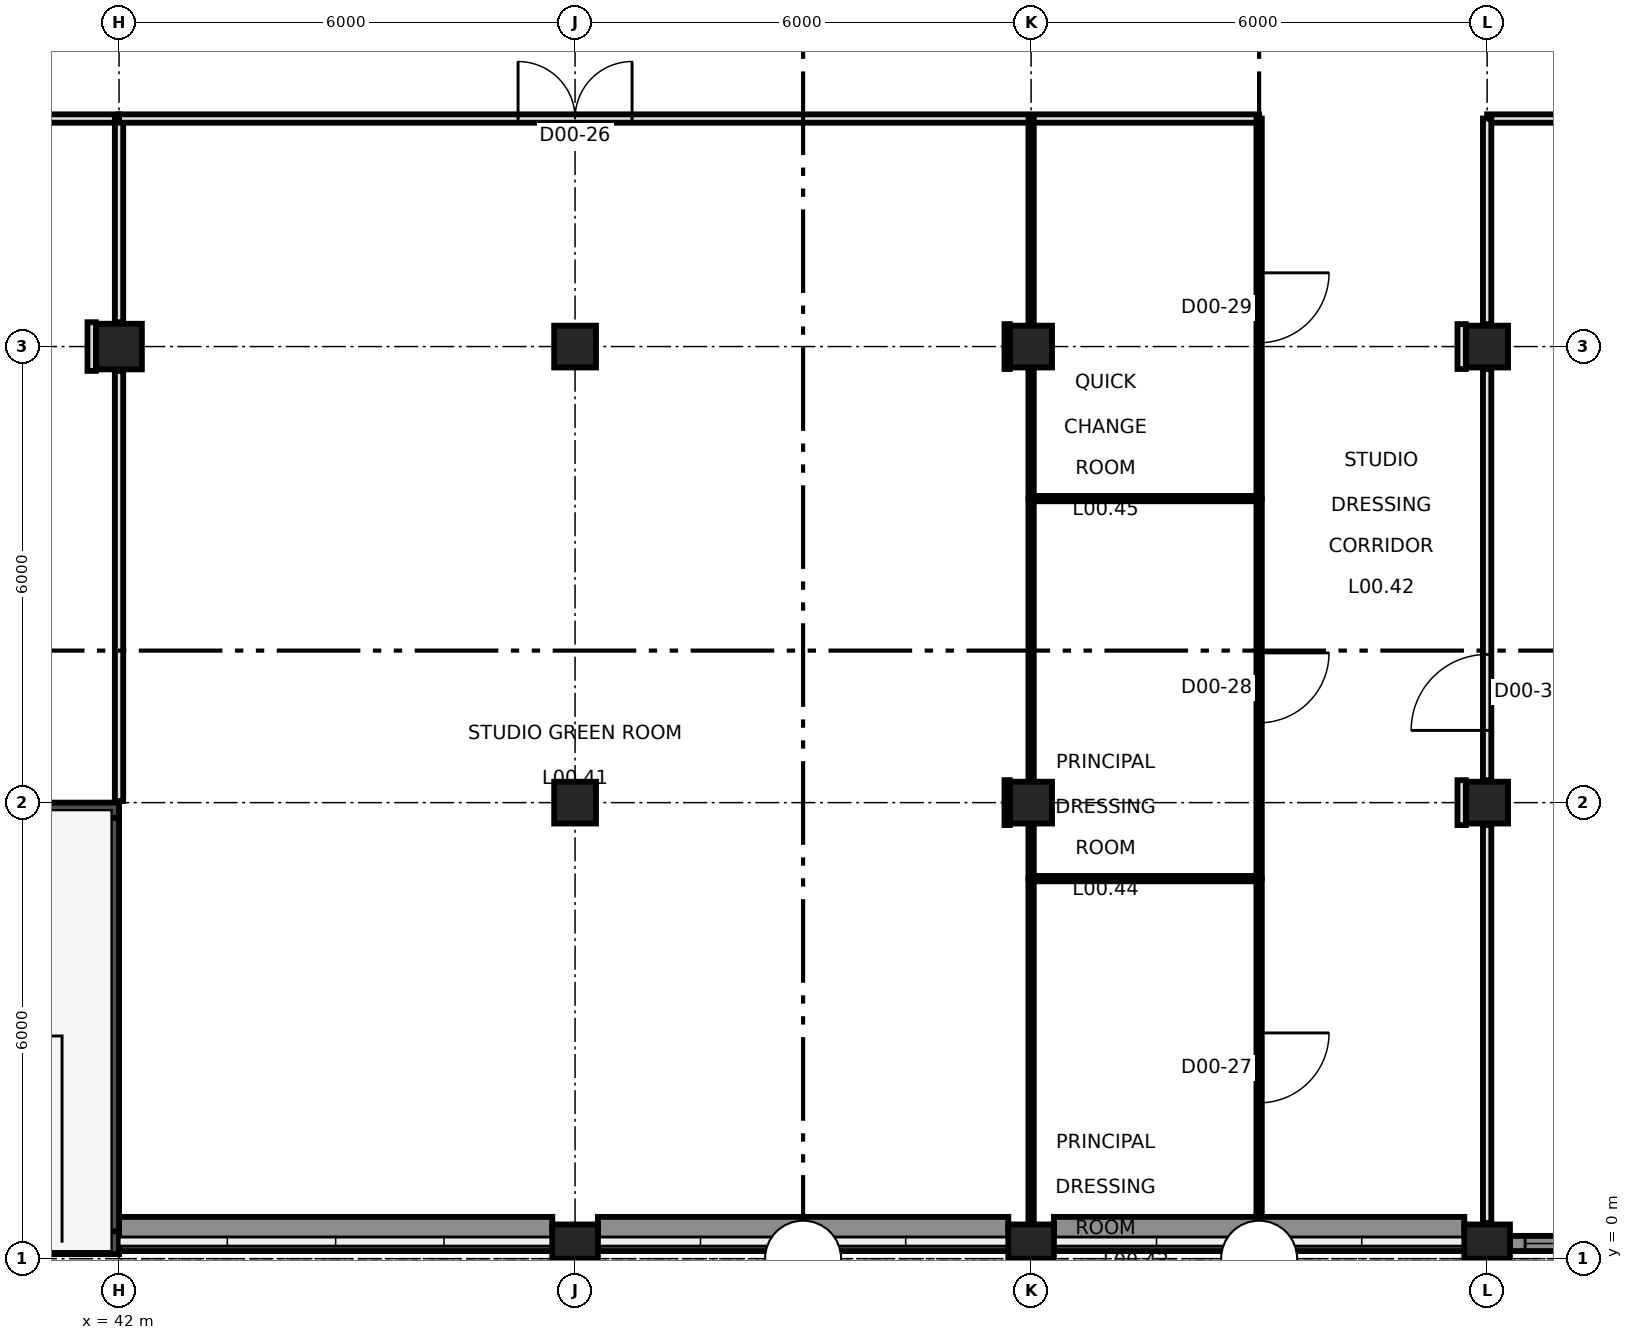
"""IFC4 building model, lengths in metres.
Left out: names, types, materials, properties, quantities, classifications, styles, units other than length and angle.
Written with IfcOpenShell. Run it as: python <this file> out.ifc"""

import sys

from ifc_helpers import new_model, si_unit, direction, frame, frame_2d, origin, origin_2d, place, context, subcontext, project, spatial, rectangle, extrude, element, fill, save


model = new_model("IFC4")
c1 = context("Model", 3, precision=1e-05, world=origin(), true_north=direction((0.0, 1.0)))
c2 = subcontext(c1, "Body", "Model", "MODEL_VIEW")
j1 = project(units=[si_unit("LENGTHUNIT", "METRE"), si_unit("PLANEANGLEUNIT", "RADIAN")], contexts=[c1])
p1 = place(None, origin())
s1 = spatial("IfcSite", under=j1, at=p1, CompositionType="ELEMENT")
p2 = place(p1, origin())
s2 = spatial("IfcBuilding", under=s1, at=p2, CompositionType="ELEMENT")
p3 = place(p2, origin())
s3 = spatial("IfcBuildingStorey", under=s2, at=p3, CompositionType="ELEMENT", Elevation=0.0)
for number, where, z_axis, x_axis in (
    (1, (48.0, 0.226, -0.3), (0.0, 0.0, 1.0), (1.0, 0.0, 0.0)),
    (2, (54.0, 0.226, -0.3), (0.0, 0.0, 1.0), (1.0, 0.0, 0.0)),
    (3, (60.0, 0.226, -0.3), (0.0, 0.0, 1.0), (1.0, 0.0, 0.0)),
):
    element("IfcColumn", number, at=place(p3, frame(where, z_axis=z_axis, x_axis=x_axis)), inside=s3, PredefinedType="COLUMN", context=c2, shape_type="SweptSolid", body=[
        extrude(rectangle(XDim=0.6, YDim=0.45, at=origin_2d()), origin(), (0.0, 0.0, 1.0), 7.3),
    ])
for number, where, z_axis, x_axis in (
    (4, (48.0, 6.0, -0.3), (0.0, 0.0, 1.0), (1.0, 0.0, 0.0)),
    (5, (54.0, 6.0, -0.3), (0.0, 0.0, 1.0), (1.0, 0.0, 0.0)),
    (6, (60.0, 6.0, -0.3), (0.0, 0.0, 1.0), (1.0, 0.0, 0.0)),
):
    element("IfcColumn", number, at=place(p3, frame(where, z_axis=z_axis, x_axis=x_axis)), inside=s3, PredefinedType="COLUMN", context=c2, shape_type="SweptSolid", body=[
        extrude(rectangle(XDim=0.55, YDim=0.55, at=origin_2d()), origin(), (0.0, 0.0, 1.0), 7.3),
    ])
p4 = place(p3, frame((42.0, 12.0, -0.3), z_axis=(0.0, 0.0, 1.0), x_axis=(1.0, 0.0, 0.0)))
e7 = element("IfcColumn", 7, at=p4, inside=s3, PredefinedType="COLUMN", context=c2, shape_type="SweptSolid", body=[
    extrude(rectangle(XDim=0.6, YDim=0.6, at=origin_2d()), origin(), (0.0, 0.0, 1.0), 7.3),
])
for number, where, z_axis, x_axis in (
    (8, (48.0, 12.0, -0.3), (0.0, 0.0, 1.0), (1.0, 0.0, 0.0)),
    (9, (54.0, 12.0, -0.3), (0.0, 0.0, 1.0), (1.0, 0.0, 0.0)),
    (10, (60.0, 12.0, -0.3), (0.0, 0.0, 1.0), (1.0, 0.0, 0.0)),
):
    element("IfcColumn", number, at=place(p3, frame(where, z_axis=z_axis, x_axis=x_axis)), inside=s3, PredefinedType="COLUMN", context=c2, shape_type="SweptSolid", body=[
        extrude(rectangle(XDim=0.55, YDim=0.55, at=origin_2d()), origin(), (0.0, 0.0, 1.0), 7.3),
    ])
p5 = place(p3, frame((36.0, 5.9, -0.3), z_axis=(0.0, 0.0, 1.0), x_axis=(1.0, 0.0, 0.0)))
e11 = element("IfcWall", 11, at=p5, inside=s3, PredefinedType="SHEAR", context=c2, shape_type="SweptSolid", body=[
    extrude(rectangle(XDim=6.0, YDim=0.2, at=frame_2d((3.0, 0.0))), origin(), (0.0, 0.0, 1.0), 7.3),
])
p6 = place(p3, frame((36.0, 0.21, -0.3), z_axis=(0.0, 0.0, 1.0), x_axis=(1.0, 0.0, 0.0)))
e12 = element("IfcWall", 12, at=p6, inside=s3, PredefinedType="SHEAR", context=c2, shape_type="SweptSolid", body=[
    extrude(rectangle(XDim=6.0, YDim=0.3, at=frame_2d((3.0, 0.0))), origin(), (0.0, 0.0, 1.0), 7.3),
])
p7 = place(p6, frame((0.325, 0.0, 0.3)))
e13 = element("IfcOpeningElement", 13, at=p7, cuts=e12, PredefinedType="OPENING", context=c2, shape_type="SweptSolid", body=[
    extrude(rectangle(XDim=1.8, YDim=2.4, at=frame_2d((0.9, 1.2))), frame((0.0, 0.16, 0.0), z_axis=(0.0, -1.0, 0.0), x_axis=(1.0, 0.0, 0.0)), (0.0, 0.0, 1.0), 0.32),
])
p8 = place(p3, frame((41.9, 0.3, -0.3), z_axis=(0.0, 0.0, 1.0), x_axis=(0.0, 1.0, 0.0)))
e14 = element("IfcWall", 14, at=p8, inside=s3, PredefinedType="SHEAR", context=c2, shape_type="SweptSolid", body=[
    extrude(rectangle(XDim=5.5, YDim=0.2, at=frame_2d((2.75, 0.0))), origin(), (0.0, 0.0, 1.0), 7.3),
])
p9 = place(p3, frame((65.54, 0.2, 0.0), z_axis=(0.0, 0.0, 1.0), x_axis=(-1.0, 0.0, 0.0)))
e15 = element("IfcWall", 15, at=p9, inside=s3, PredefinedType="SOLIDWALL", context=c2, shape_type="SweptSolid", body=[
    extrude(rectangle(XDim=5.24, YDim=0.2, at=frame_2d((2.62, 0.0))), origin(), (0.0, 0.0, 1.0), 6.75),
])
p10 = place(p9, frame((2.02, 0.0, 0.0)))
e16 = element("IfcOpeningElement", 16, at=p10, cuts=e15, PredefinedType="OPENING", context=c2, shape_type="SweptSolid", body=[
    extrude(rectangle(XDim=1.1, YDim=2.4, at=frame_2d((0.55, 1.2))), frame((0.0, 0.11, 0.0), z_axis=(0.0, -1.0, 0.0), x_axis=(1.0, 0.0, 0.0)), (0.0, 0.0, 1.0), 0.22),
])
p11 = place(p9, frame((2.02, 0.0, 2.5)))
e17 = element("IfcOpeningElement", 17, at=p11, cuts=e15, PredefinedType="OPENING", context=c2, shape_type="SweptSolid", body=[
    extrude(rectangle(XDim=1.1, YDim=3.9, at=frame_2d((0.55, 1.95))), frame((0.0, 0.11, 0.0), z_axis=(0.0, -1.0, 0.0), x_axis=(1.0, 0.0, 0.0)), (0.0, 0.0, 1.0), 0.22),
])
p12 = place(p9, frame((0.2, 0.0, 0.1)))
e18 = element("IfcOpeningElement", 18, at=p12, cuts=e15, PredefinedType="OPENING", context=c2, shape_type="SweptSolid", body=[
    extrude(rectangle(XDim=1.82, YDim=6.3, at=frame_2d((0.91, 3.15))), frame((0.0, 0.11, 0.0), z_axis=(0.0, -1.0, 0.0), x_axis=(1.0, 0.0, 0.0)), (0.0, 0.0, 1.0), 0.22),
])
p13 = place(p9, frame((3.12, 0.0, 0.1)))
e19 = element("IfcOpeningElement", 19, at=p13, cuts=e15, PredefinedType="OPENING", context=c2, shape_type="SweptSolid", body=[
    extrude(rectangle(XDim=1.92, YDim=6.3, at=frame_2d((0.96, 3.15))), frame((0.0, 0.11, 0.0), z_axis=(0.0, -1.0, 0.0), x_axis=(1.0, 0.0, 0.0)), (0.0, 0.0, 1.0), 0.22),
])
for number, where, z_axis, x_axis in (
    (20, (59.7, 0.325, 0.0), (0.0, 0.0, 1.0), (-1.0, 0.0, 0.0)),
    (21, (53.7, 0.325, 0.0), (0.0, 0.0, 1.0), (-1.0, 0.0, 0.0)),
):
    element("IfcWall", number, at=place(p3, frame(where, z_axis=z_axis, x_axis=x_axis)), inside=s3, PredefinedType="SOLIDWALL", context=c2, shape_type="SweptSolid", body=[
        extrude(rectangle(XDim=5.4, YDim=0.45, at=frame_2d((2.7, 0.0))), origin(), (0.0, 0.0, 1.0), 4.8),
    ])
p14 = place(p3, frame((47.7, 0.325, 0.0), z_axis=(0.0, 0.0, 1.0), x_axis=(-1.0, 0.0, 0.0)))
e22 = element("IfcWall", 22, at=p14, inside=s3, PredefinedType="SOLIDWALL", context=c2, shape_type="SweptSolid", body=[
    extrude(rectangle(XDim=5.7, YDim=0.45, at=frame_2d((2.85, 0.0))), origin(), (0.0, 0.0, 1.0), 4.8),
])
p15 = place(p3, frame((36.02, 15.0, 0.0), z_axis=(0.0, 0.0, 1.0), x_axis=(1.0, 0.0, 0.0)))
e23 = element("IfcWall", 23, at=p15, inside=s3, PredefinedType="PARTITIONING", context=c2, shape_type="SweptSolid", body=[
    extrude(rectangle(XDim=5.98, YDim=0.11, at=frame_2d((2.99, 0.0))), origin(), (0.0, 0.0, 1.0), 6.15),
])
p16 = place(p15, frame((2.53, 0.0, 0.0)))
e24 = element("IfcOpeningElement", 24, at=p16, cuts=e23, PredefinedType="OPENING", context=c2, shape_type="SweptSolid", body=[
    extrude(rectangle(XDim=0.92, YDim=2.04, at=frame_2d((0.46, 1.02))), frame((0.0, 0.065, 0.0), z_axis=(0.0, -1.0, 0.0), x_axis=(1.0, 0.0, 0.0)), (0.0, 0.0, 1.0), 0.13),
])
p17 = place(p3, frame((42.0, 12.32, 0.0), z_axis=(0.0, 0.0, 1.0), x_axis=(0.0, 1.0, 0.0)))
e25 = element("IfcWall", 25, at=p17, inside=s3, PredefinedType="PARTITIONING", context=c2, shape_type="SweptSolid", body=[
    extrude(rectangle(XDim=2.68, YDim=0.11, at=frame_2d((1.34, 0.0))), origin(), (0.0, 0.0, 1.0), 6.15),
])
p18 = place(p3, frame((42.0, 6.02, 0.0), z_axis=(0.0, 0.0, 1.0), x_axis=(0.0, 1.0, 0.0)))
e26 = element("IfcWall", 26, at=p18, inside=s3, PredefinedType="PARTITIONING", context=c2, shape_type="SweptSolid", body=[
    extrude(rectangle(XDim=5.66, YDim=0.11, at=frame_2d((2.83, 0.0))), origin(), (0.0, 0.0, 1.0), 6.15),
])
p19 = place(p3, frame((41.64, 11.68, 0.0), z_axis=(0.0, 0.0, 1.0), x_axis=(0.0, 1.0, 0.0)))
e27 = element("IfcWall", 27, at=p19, inside=s3, PredefinedType="PARTITIONING", context=c2, shape_type="SweptSolid", body=[
    extrude(rectangle(XDim=0.64, YDim=0.11, at=frame_2d((0.32, 0.0))), origin(), (0.0, 0.0, 1.0), 6.15),
])
p20 = place(p3, frame((42.0, 15.0, 0.0), z_axis=(0.0, 0.0, 1.0), x_axis=(1.0, 0.0, 0.0)))
e28 = element("IfcWall", 28, at=p20, inside=s3, PredefinedType="PARTITIONING", context=c2, shape_type="SweptSolid", body=[
    extrude(rectangle(XDim=15.0, YDim=0.11, at=frame_2d((7.5, 0.0))), origin(), (0.0, 0.0, 1.0), 6.15),
])
p21 = place(p20, frame((5.25, 0.0, 0.0)))
e29 = element("IfcOpeningElement", 29, at=p21, cuts=e28, PredefinedType="OPENING", context=c2, shape_type="SweptSolid", body=[
    extrude(rectangle(XDim=1.5, YDim=2.1, at=frame_2d((0.75, 1.05))), frame((0.0, 0.065, 0.0), z_axis=(0.0, -1.0, 0.0), x_axis=(1.0, 0.0, 0.0)), (0.0, 0.0, 1.0), 0.13),
])
p22 = place(p3, frame((60.0, 15.0, 0.0), z_axis=(0.0, 0.0, 1.0), x_axis=(1.0, 0.0, 0.0)))
e30 = element("IfcWall", 30, at=p22, inside=s3, PredefinedType="PARTITIONING", context=c2, shape_type="SweptSolid", body=[
    extrude(rectangle(XDim=5.52, YDim=0.11, at=frame_2d((2.76, 0.0))), origin(), (0.0, 0.0, 1.0), 6.15),
])
p23 = place(p3, frame((60.0, 12.295, 0.0), z_axis=(0.0, 0.0, 1.0), x_axis=(0.0, 1.0, 0.0)))
e31 = element("IfcWall", 31, at=p23, inside=s3, PredefinedType="PARTITIONING", context=c2, shape_type="SweptSolid", body=[
    extrude(rectangle(XDim=2.705, YDim=0.11, at=frame_2d((1.353, 0.0))), origin(), (0.0, 0.0, 1.0), 6.15),
])
p24 = place(p3, frame((60.0, 6.295, 0.0), z_axis=(0.0, 0.0, 1.0), x_axis=(0.0, 1.0, 0.0)))
e32 = element("IfcWall", 32, at=p24, inside=s3, PredefinedType="PARTITIONING", context=c2, shape_type="SweptSolid", body=[
    extrude(rectangle(XDim=5.41, YDim=0.11, at=frame_2d((2.705, 0.0))), origin(), (0.0, 0.0, 1.0), 6.15),
])
p25 = place(p24, frame((0.655, 0.0, 0.0)))
e33 = element("IfcOpeningElement", 33, at=p25, cuts=e32, PredefinedType="OPENING", context=c2, shape_type="SweptSolid", body=[
    extrude(rectangle(XDim=1.0, YDim=2.1, at=frame_2d((0.5, 1.05))), frame((0.0, 0.065, 0.0), z_axis=(0.0, -1.0, 0.0), x_axis=(1.0, 0.0, 0.0)), (0.0, 0.0, 1.0), 0.13),
])
p26 = place(p3, frame((60.0, 0.47, 0.0), z_axis=(0.0, 0.0, 1.0), x_axis=(0.0, 1.0, 0.0)))
e34 = element("IfcWall", 34, at=p26, inside=s3, PredefinedType="PARTITIONING", context=c2, shape_type="SweptSolid", body=[
    extrude(rectangle(XDim=5.235, YDim=0.11, at=frame_2d((2.617, 0.0))), origin(), (0.0, 0.0, 1.0), 6.15),
])
for number, where, z_axis, x_axis in (
    (35, (59.665, 11.705, 0.0), (0.0, 0.0, 1.0), (0.0, 1.0, 0.0)),
    (36, (59.665, 5.705, 0.0), (0.0, 0.0, 1.0), (0.0, 1.0, 0.0)),
):
    element("IfcWall", number, at=place(p3, frame(where, z_axis=z_axis, x_axis=x_axis)), inside=s3, PredefinedType="PARTITIONING", context=c2, shape_type="SweptSolid", body=[
        extrude(rectangle(XDim=0.59, YDim=0.11, at=frame_2d((0.295, 0.0))), origin(), (0.0, 0.0, 1.0), 6.15),
    ])
p27 = place(p3, frame((54.0, 0.47, 0.0), z_axis=(0.0, 0.0, 1.0), x_axis=(0.0, 1.0, 0.0)))
e37 = element("IfcWall", 37, at=p27, inside=s3, PredefinedType="PARTITIONING", context=c2, shape_type="SweptSolid", body=[
    extrude(rectangle(XDim=4.53, YDim=0.07, at=frame_2d((2.265, 0.0))), origin(), (0.0, 0.0, 1.0), 6.15),
])
p28 = place(p3, frame((54.0, 5.0, 0.0), z_axis=(0.0, 0.0, 1.0), x_axis=(1.0, 0.0, 0.0)))
e38 = element("IfcWall", 38, at=p28, inside=s3, PredefinedType="PARTITIONING", context=c2, shape_type="SweptSolid", body=[
    extrude(rectangle(XDim=3.0, YDim=0.07, at=frame_2d((1.5, 0.0))), origin(), (0.0, 0.0, 1.0), 6.15),
])
p29 = place(p3, frame((54.0, 6.295, 0.0), z_axis=(0.0, 0.0, 1.0), x_axis=(0.0, 1.0, 0.0)))
e39 = element("IfcWall", 39, at=p29, inside=s3, PredefinedType="PARTITIONING", context=c2, shape_type="SweptSolid", body=[
    extrude(rectangle(XDim=3.705, YDim=0.07, at=frame_2d((1.853, 0.0))), origin(), (0.0, 0.0, 1.0), 6.15),
])
p30 = place(p3, frame((54.0, 5.0, 0.0), z_axis=(0.0, 0.0, 1.0), x_axis=(0.0, 1.0, 0.0)))
e40 = element("IfcWall", 40, at=p30, inside=s3, PredefinedType="PARTITIONING", context=c2, shape_type="SweptSolid", body=[
    extrude(rectangle(XDim=0.705, YDim=0.07, at=frame_2d((0.353, 0.0))), origin(), (0.0, 0.0, 1.0), 6.15),
])
p31 = place(p3, frame((53.685, 5.705, 0.0), z_axis=(0.0, 0.0, 1.0), x_axis=(0.0, 1.0, 0.0)))
e41 = element("IfcWall", 41, at=p31, inside=s3, PredefinedType="PARTITIONING", context=c2, shape_type="SweptSolid", body=[
    extrude(rectangle(XDim=0.59, YDim=0.07, at=frame_2d((0.295, 0.0))), origin(), (0.0, 0.0, 1.0), 6.15),
])
p32 = place(p3, frame((54.0, 10.0, 0.0), z_axis=(0.0, 0.0, 1.0), x_axis=(1.0, 0.0, 0.0)))
e42 = element("IfcWall", 42, at=p32, inside=s3, PredefinedType="PARTITIONING", context=c2, shape_type="SweptSolid", body=[
    extrude(rectangle(XDim=3.0, YDim=0.07, at=frame_2d((1.5, 0.0))), origin(), (0.0, 0.0, 1.0), 6.15),
])
p33 = place(p3, frame((54.0, 12.295, 0.0), z_axis=(0.0, 0.0, 1.0), x_axis=(0.0, 1.0, 0.0)))
e43 = element("IfcWall", 43, at=p33, inside=s3, PredefinedType="PARTITIONING", context=c2, shape_type="SweptSolid", body=[
    extrude(rectangle(XDim=2.705, YDim=0.07, at=frame_2d((1.353, 0.0))), origin(), (0.0, 0.0, 1.0), 6.15),
])
p34 = place(p3, frame((54.0, 10.0, 0.0), z_axis=(0.0, 0.0, 1.0), x_axis=(0.0, 1.0, 0.0)))
e44 = element("IfcWall", 44, at=p34, inside=s3, PredefinedType="PARTITIONING", context=c2, shape_type="SweptSolid", body=[
    extrude(rectangle(XDim=1.705, YDim=0.07, at=frame_2d((0.853, 0.0))), origin(), (0.0, 0.0, 1.0), 6.15),
])
p35 = place(p3, frame((53.685, 11.705, 0.0), z_axis=(0.0, 0.0, 1.0), x_axis=(0.0, 1.0, 0.0)))
e45 = element("IfcWall", 45, at=p35, inside=s3, PredefinedType="PARTITIONING", context=c2, shape_type="SweptSolid", body=[
    extrude(rectangle(XDim=0.59, YDim=0.07, at=frame_2d((0.295, 0.0))), origin(), (0.0, 0.0, 1.0), 6.15),
])
p36 = place(p3, frame((57.0, 0.57, 0.0), z_axis=(0.0, 0.0, 1.0), x_axis=(0.0, 1.0, 0.0)))
e46 = element("IfcWall", 46, at=p36, inside=s3, PredefinedType="PARTITIONING", context=c2, shape_type="SweptSolid", body=[
    extrude(rectangle(XDim=4.43, YDim=0.07, at=frame_2d((2.215, 0.0))), origin(), (0.0, 0.0, 1.0), 6.3),
])
p37 = place(p36, frame((1.48, 0.0, 0.0)))
e47 = element("IfcOpeningElement", 47, at=p37, cuts=e46, PredefinedType="OPENING", context=c2, shape_type="SweptSolid", body=[
    extrude(rectangle(XDim=0.92, YDim=2.04, at=frame_2d((0.46, 1.02))), frame((0.0, 0.045, 0.0), z_axis=(0.0, -1.0, 0.0), x_axis=(1.0, 0.0, 0.0)), (0.0, 0.0, 1.0), 0.09),
])
p38 = place(p3, frame((57.0, 5.0, 0.0), z_axis=(0.0, 0.0, 1.0), x_axis=(0.0, 1.0, 0.0)))
e48 = element("IfcWall", 48, at=p38, inside=s3, PredefinedType="PARTITIONING", context=c2, shape_type="SweptSolid", body=[
    extrude(rectangle(XDim=5.0, YDim=0.07, at=frame_2d((2.5, 0.0))), origin(), (0.0, 0.0, 1.0), 6.15),
])
p39 = place(p38, frame((2.05, 0.0, 0.0)))
e49 = element("IfcOpeningElement", 49, at=p39, cuts=e48, PredefinedType="OPENING", context=c2, shape_type="SweptSolid", body=[
    extrude(rectangle(XDim=0.92, YDim=2.04, at=frame_2d((0.46, 1.02))), frame((0.0, 0.045, 0.0), z_axis=(0.0, -1.0, 0.0), x_axis=(1.0, 0.0, 0.0)), (0.0, 0.0, 1.0), 0.09),
])
p40 = place(p3, frame((57.0, 10.0, 0.0), z_axis=(0.0, 0.0, 1.0), x_axis=(0.0, 1.0, 0.0)))
e50 = element("IfcWall", 50, at=p40, inside=s3, PredefinedType="PARTITIONING", context=c2, shape_type="SweptSolid", body=[
    extrude(rectangle(XDim=5.0, YDim=0.07, at=frame_2d((2.5, 0.0))), origin(), (0.0, 0.0, 1.0), 6.15),
])
p41 = place(p40, frame((2.05, 0.0, 0.0)))
e51 = element("IfcOpeningElement", 51, at=p41, cuts=e50, PredefinedType="OPENING", context=c2, shape_type="SweptSolid", body=[
    extrude(rectangle(XDim=0.92, YDim=2.04, at=frame_2d((0.46, 1.02))), frame((0.0, 0.045, 0.0), z_axis=(0.0, -1.0, 0.0), x_axis=(1.0, 0.0, 0.0)), (0.0, 0.0, 1.0), 0.09),
])
p42 = place(p13, origin())
e52 = element("IfcWindow", 52, at=p42, inside=s3, PartitioningType="SINGLE_PANEL", PredefinedType="WINDOW", context=c2, shape_type="SweptSolid", body=[
    extrude(rectangle(XDim=1.92, YDim=6.3, at=frame_2d((0.96, 3.15))), frame((0.0, 0.03, 0.0), z_axis=(0.0, -1.0, 0.0), x_axis=(1.0, 0.0, 0.0)), (0.0, 0.0, 1.0), 0.06),
])
fill(e19, e52)
p43 = place(p21, origin())
e53 = element("IfcDoor", 53, at=p43, inside=s3, OperationType="DOUBLE_DOOR_SINGLE_SWING", PredefinedType="DOOR", context=c2, shape_type="SweptSolid", body=[
    extrude(rectangle(XDim=1.5, YDim=2.1, at=frame_2d((0.75, 1.05))), frame((0.0, 0.025, 0.0), z_axis=(0.0, -1.0, 0.0), x_axis=(1.0, 0.0, 0.0)), (0.0, 0.0, 1.0), 0.05),
])
fill(e29, e53)
p44 = place(p37, origin())
e54 = element("IfcDoor", 54, at=p44, inside=s3, OperationType="SINGLE_SWING_RIGHT", PredefinedType="DOOR", context=c2, shape_type="SweptSolid", body=[
    extrude(rectangle(XDim=0.92, YDim=2.04, at=frame_2d((0.46, 1.02))), frame((0.0, 0.025, 0.0), z_axis=(0.0, -1.0, 0.0), x_axis=(1.0, 0.0, 0.0)), (0.0, 0.0, 1.0), 0.05),
])
fill(e47, e54)
p45 = place(p39, origin())
e55 = element("IfcDoor", 55, at=p45, inside=s3, OperationType="SINGLE_SWING_RIGHT", PredefinedType="DOOR", context=c2, shape_type="SweptSolid", body=[
    extrude(rectangle(XDim=0.92, YDim=2.04, at=frame_2d((0.46, 1.02))), frame((0.0, 0.025, 0.0), z_axis=(0.0, -1.0, 0.0), x_axis=(1.0, 0.0, 0.0)), (0.0, 0.0, 1.0), 0.05),
])
fill(e49, e55)
p46 = place(p41, origin())
e56 = element("IfcDoor", 56, at=p46, inside=s3, OperationType="SINGLE_SWING_RIGHT", PredefinedType="DOOR", context=c2, shape_type="SweptSolid", body=[
    extrude(rectangle(XDim=0.92, YDim=2.04, at=frame_2d((0.46, 1.02))), frame((0.0, 0.025, 0.0), z_axis=(0.0, -1.0, 0.0), x_axis=(1.0, 0.0, 0.0)), (0.0, 0.0, 1.0), 0.05),
])
fill(e51, e56)
p47 = place(p25, frame((1.0, 0.0, 0.0), z_axis=(0.0, 0.0, 1.0), x_axis=(-1.0, 0.0, 0.0)))
e57 = element("IfcDoor", 57, at=p47, inside=s3, OperationType="SINGLE_SWING_LEFT", PredefinedType="DOOR", context=c2, shape_type="SweptSolid", body=[
    extrude(rectangle(XDim=1.0, YDim=2.1, at=frame_2d((0.5, 1.05))), frame((0.0, 0.025, 0.0), z_axis=(0.0, -1.0, 0.0), x_axis=(1.0, 0.0, 0.0)), (0.0, 0.0, 1.0), 0.05),
])
fill(e33, e57)
save(model, sys.argv[1])
